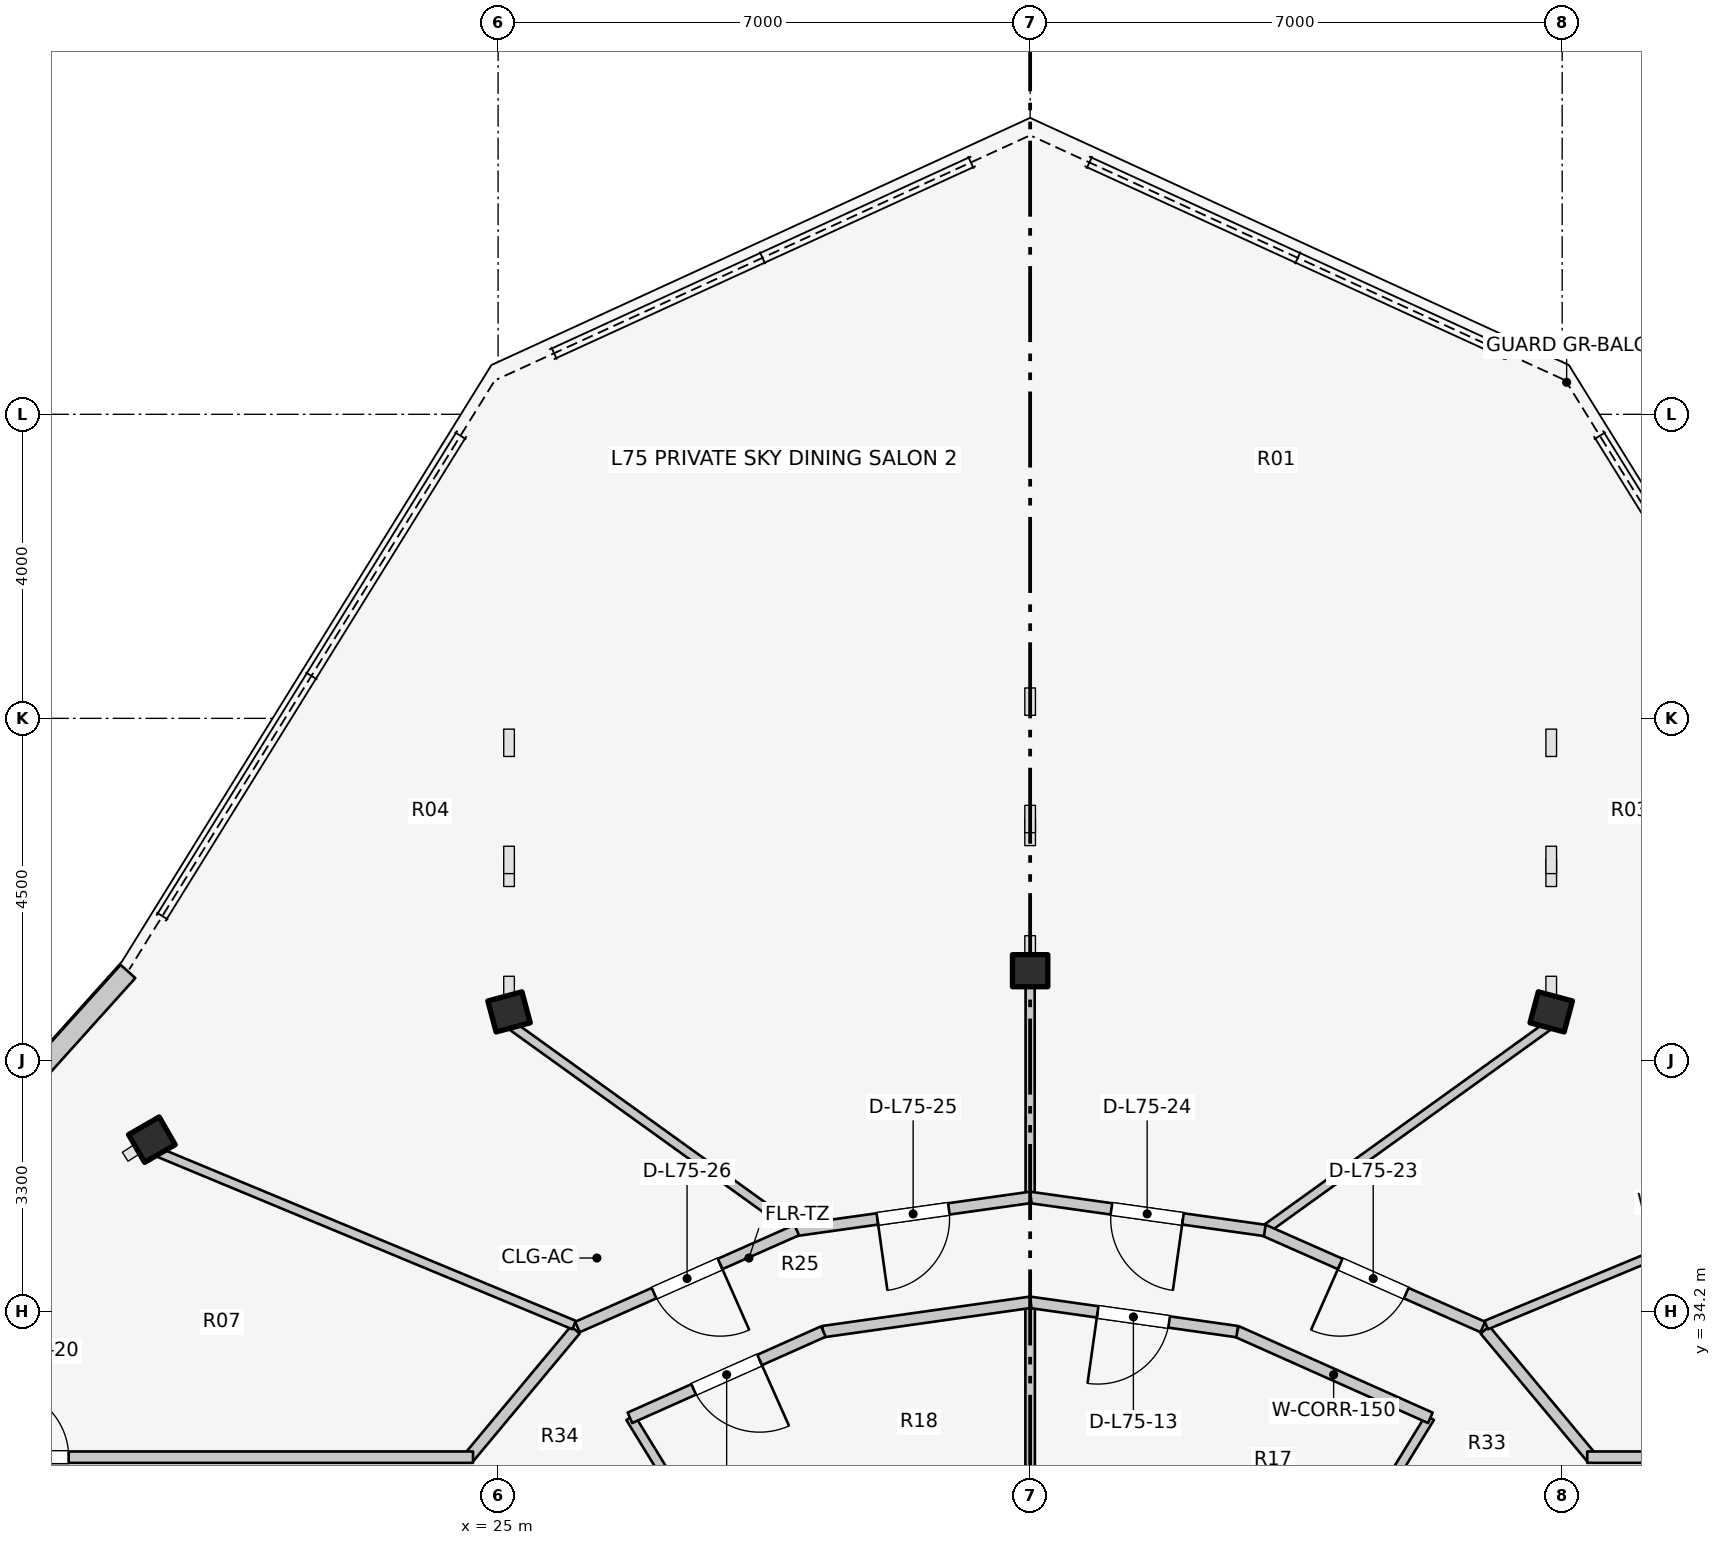
"""IFC4 building model, lengths in metres.
Left out: names, types, materials, properties, quantities, classifications, styles, units other than length and angle.
Written with IfcOpenShell. Run it as: python <this file> out.ifc"""

import sys

from ifc_helpers import new_model, si_unit, direction, frame, frame_2d, origin, origin_2d, place, context, subcontext, project, spatial, rectangle, i_section, extrude, element, fill, save


model = new_model("IFC4")
c1 = context("Model", 3, precision=1e-05, world=origin(), true_north=direction((0.0, 1.0)))
c2 = subcontext(c1, "Body", "Model", "MODEL_VIEW")
j1 = project(units=[si_unit("LENGTHUNIT", "METRE"), si_unit("PLANEANGLEUNIT", "RADIAN")], contexts=[c1])
p1 = place(None, origin())
s1 = spatial("IfcSite", under=j1, at=p1, CompositionType="ELEMENT")
p2 = place(p1, origin())
s2 = spatial("IfcBuilding", under=s1, at=p2, CompositionType="ELEMENT")
p3 = place(p2, frame((0.0, 0.0, 246.0)))
s3 = spatial("IfcBuildingStorey", under=s2, at=p3, CompositionType="ELEMENT", Elevation=246.0)
for number, where, z_axis, x_axis in (
    (1, (38.856, 38.138, 0.0), (0.0, 0.0, 1.0), (0.259, 0.966, 0.0)),
    (2, (32.0, 38.68, 0.0), (0.0, 0.0, 1.0), (0.0, 1.0, 0.0)),
    (3, (25.144, 38.138, 0.0), (0.0, 0.0, 1.0), (-0.259, 0.966, 0.0)),
    (4, (20.445, 36.457, 0.0), (0.0, 0.0, 1.0), (-0.5, 0.866, 0.0)),
):
    element("IfcColumn", number, at=place(p3, frame(where, z_axis=z_axis, x_axis=x_axis)), inside=s3, PredefinedType="COLUMN", context=c2, shape_type="SweptSolid", body=[
        extrude(i_section(OverallWidth=0.422, OverallDepth=0.465, WebThickness=0.045, FlangeThickness=0.073, FilletRadius=0.025, at=origin_2d()), origin(), (0.0, 0.0, 1.0), 3.6),
    ])
p4 = place(p3, frame((20.13, 38.67, 0.0), z_axis=(0.0, 0.0, 1.0), x_axis=(-0.668903560134, -0.743349196031, 0.0)))
e5 = element("IfcWall", 5, at=p4, inside=s3, PredefinedType="STANDARD", context=c2, shape_type="SweptSolid", body=[
    extrude(rectangle(XDim=5.513, YDim=0.26, at=frame_2d((2.756, 0.0))), origin(), (0.0, 0.0, 1.0), 3.29),
])
p5 = place(p3, frame((35.55, 30.015, 0.0), z_axis=(0.0, 0.0, 1.0), x_axis=(0.522763432117, 0.852477796802, 0.0)))
e6 = element("IfcWall", 6, at=p5, inside=s3, PredefinedType="PARTITIONING", context=c2, shape_type="SweptSolid", body=[
    extrude(rectangle(XDim=3.269, YDim=0.125, at=frame_2d((1.635, 0.0))), origin(), (0.0, 0.0, 1.0), 2.672),
])
p6 = place(p3, frame((32.0, 31.1, 0.0), z_axis=(0.0, 0.0, 1.0), x_axis=(0.0, 1.0, 0.0)))
e7 = element("IfcWall", 7, at=p6, inside=s3, PredefinedType="PARTITIONING", context=c2, shape_type="SweptSolid", body=[
    extrude(rectangle(XDim=3.218, YDim=0.125, at=frame_2d((1.609, 0.0))), origin(), (0.0, 0.0, 1.0), 2.672),
])
p7 = place(p3, frame((28.45, 30.015, 0.0), z_axis=(0.0, 0.0, 1.0), x_axis=(-0.522763432117, 0.852477796802, 0.0)))
e8 = element("IfcWall", 8, at=p7, inside=s3, PredefinedType="PARTITIONING", context=c2, shape_type="SweptSolid", body=[
    extrude(rectangle(XDim=3.269, YDim=0.125, at=frame_2d((1.635, 0.0))), origin(), (0.0, 0.0, 1.0), 2.672),
])
p8 = place(p3, frame((37.265, 32.798, 0.0), z_axis=(0.0, 0.0, 1.0), x_axis=(-0.913254317828, 0.407389924971, 0.0)))
e9 = element("IfcWall", 9, at=p8, inside=s3, PredefinedType="PARTITIONING", context=c2, shape_type="SweptSolid", body=[
    extrude(rectangle(XDim=2.787, YDim=0.15, at=frame_2d((1.393, 0.0))), origin(), (0.0, 0.0, 1.0), 2.823),
])
p9 = place(p3, frame((34.724, 33.932, 0.0), z_axis=(0.0, 0.0, 1.0), x_axis=(-0.990150268487, 0.140008734782, 0.0)))
e10 = element("IfcWall", 10, at=p9, inside=s3, PredefinedType="PARTITIONING", context=c2, shape_type="SweptSolid", body=[
    extrude(rectangle(XDim=2.759, YDim=0.15, at=frame_2d((1.379, 0.0))), origin(), (0.0, 0.0, 1.0), 2.823),
])
p10 = place(p9, frame((0.904, 0.0, 0.0)))
e11 = element("IfcOpeningElement", 11, at=p10, cuts=e10, PredefinedType="OPENING", context=c2, shape_type="SweptSolid", body=[
    extrude(rectangle(XDim=0.95, YDim=2.1, at=frame_2d((0.475, 1.05))), frame((0.0, 0.085, 0.0), z_axis=(0.0, -1.0, 0.0), x_axis=(1.0, 0.0, 0.0)), (0.0, 0.0, 1.0), 0.17),
])
p11 = place(p3, frame((32.007, 34.318, 0.0), z_axis=(0.0, 0.0, 1.0), x_axis=(-0.990150268487, -0.140008734782, 0.0)))
e12 = element("IfcWall", 12, at=p11, inside=s3, PredefinedType="PARTITIONING", context=c2, shape_type="SweptSolid", body=[
    extrude(rectangle(XDim=2.759, YDim=0.15, at=frame_2d((1.379, 0.0))), origin(), (0.0, 0.0, 1.0), 2.823),
])
p12 = place(p3, frame((29.28, 33.933, 0.0), z_axis=(0.0, 0.0, 1.0), x_axis=(-0.913254317828, -0.407389924971, 0.0)))
e13 = element("IfcWall", 13, at=p12, inside=s3, PredefinedType="PARTITIONING", context=c2, shape_type="SweptSolid", body=[
    extrude(rectangle(XDim=2.787, YDim=0.15, at=frame_2d((1.393, 0.0))), origin(), (0.0, 0.0, 1.0), 2.823),
])
p13 = place(p12, frame((0.918, 0.0, 0.0)))
e14 = element("IfcOpeningElement", 14, at=p13, cuts=e13, PredefinedType="OPENING", context=c2, shape_type="SweptSolid", body=[
    extrude(rectangle(XDim=0.95, YDim=2.1, at=frame_2d((0.475, 1.05))), frame((0.0, 0.085, 0.0), z_axis=(0.0, -1.0, 0.0), x_axis=(1.0, 0.0, 0.0)), (0.0, 0.0, 1.0), 0.17),
])
p14 = place(p3, frame((37.984, 33.955, 0.0), z_axis=(0.0, 0.0, 1.0), x_axis=(0.64030392053, -0.76812166312, 0.0)))
e15 = element("IfcWall", 15, at=p14, inside=s3, PredefinedType="PARTITIONING", context=c2, shape_type="SweptSolid", body=[
    extrude(rectangle(XDim=2.21, YDim=0.15, at=frame_2d((1.105, 0.0))), origin(), (0.0, 0.0, 1.0), 2.816),
])
p15 = place(p3, frame((39.33, 32.28, 0.0), z_axis=(0.0, 0.0, 1.0), x_axis=(1.0, 0.0, 0.0)))
e16 = element("IfcWall", 16, at=p15, inside=s3, PredefinedType="PARTITIONING", context=c2, shape_type="SweptSolid", body=[
    extrude(rectangle(XDim=7.52, YDim=0.15, at=frame_2d((3.76, 0.0))), origin(), (0.0, 0.0, 1.0), 2.816),
])
p16 = place(p15, frame((5.22, 0.0, 0.0)))
e17 = element("IfcOpeningElement", 17, at=p16, cuts=e16, PredefinedType="OPENING", context=c2, shape_type="SweptSolid", body=[
    extrude(rectangle(XDim=0.9, YDim=2.1, at=frame_2d((0.45, 1.05))), frame((0.0, 0.085, 0.0), z_axis=(0.0, -1.0, 0.0), x_axis=(1.0, 0.0, 0.0)), (0.0, 0.0, 1.0), 0.17),
])
p17 = place(p3, frame((26.016, 33.955, 0.0), z_axis=(0.0, 0.0, 1.0), x_axis=(-0.64030392053, -0.76812166312, 0.0)))
e18 = element("IfcWall", 18, at=p17, inside=s3, PredefinedType="PARTITIONING", context=c2, shape_type="SweptSolid", body=[
    extrude(rectangle(XDim=2.21, YDim=0.15, at=frame_2d((1.105, 0.0))), origin(), (0.0, 0.0, 1.0), 2.816),
])
p18 = place(p3, frame((17.15, 32.28, 0.0), z_axis=(0.0, 0.0, 1.0), x_axis=(1.0, 0.0, 0.0)))
e19 = element("IfcWall", 19, at=p18, inside=s3, PredefinedType="PARTITIONING", context=c2, shape_type="SweptSolid", body=[
    extrude(rectangle(XDim=7.52, YDim=0.15, at=frame_2d((3.76, 0.0))), origin(), (0.0, 0.0, 1.0), 2.816),
])
p19 = place(p18, frame((1.3, 0.0, 0.0)))
e20 = element("IfcOpeningElement", 20, at=p19, cuts=e19, PredefinedType="OPENING", context=c2, shape_type="SweptSolid", body=[
    extrude(rectangle(XDim=0.9, YDim=2.1, at=frame_2d((0.45, 1.05))), frame((0.0, 0.085, 0.0), z_axis=(0.0, -1.0, 0.0), x_axis=(1.0, 0.0, 0.0)), (0.0, 0.0, 1.0), 0.17),
])
p20 = place(p3, frame((38.0, 34.018, 0.0), z_axis=(0.0, 0.0, 1.0), x_axis=(0.92349333748, 0.383614462228, 0.0)))
e21 = element("IfcWall", 21, at=p20, inside=s3, PredefinedType="MOVABLE", context=c2, shape_type="SweptSolid", body=[
    extrude(rectangle(XDim=5.907, YDim=0.12, at=frame_2d((2.954, 0.0))), origin(), (0.0, 0.0, 1.0), 2.66),
])
p21 = place(p3, frame((35.124, 35.297, 0.0), z_axis=(0.0, 0.0, 1.0), x_axis=(0.811745719064, 0.584011033783, 0.0)))
e22 = element("IfcWall", 22, at=p21, inside=s3, PredefinedType="MOVABLE", context=c2, shape_type="SweptSolid", body=[
    extrude(rectangle(XDim=4.534, YDim=0.12, at=frame_2d((2.267, 0.0))), origin(), (0.0, 0.0, 1.0), 2.66),
])
p22 = place(p3, frame((32.0, 35.753, 0.0), z_axis=(0.0, 0.0, 1.0), x_axis=(0.0, 1.0, 0.0)))
e23 = element("IfcWall", 23, at=p22, inside=s3, PredefinedType="MOVABLE", context=c2, shape_type="SweptSolid", body=[
    extrude(rectangle(XDim=2.727, YDim=0.12, at=frame_2d((1.364, 0.0))), origin(), (0.0, 0.0, 1.0), 2.66),
])
p23 = place(p3, frame((28.876, 35.297, 0.0), z_axis=(0.0, 0.0, 1.0), x_axis=(-0.811745719064, 0.584011033783, 0.0)))
e24 = element("IfcWall", 24, at=p23, inside=s3, PredefinedType="MOVABLE", context=c2, shape_type="SweptSolid", body=[
    extrude(rectangle(XDim=4.534, YDim=0.12, at=frame_2d((2.267, 0.0))), origin(), (0.0, 0.0, 1.0), 2.66),
])
p24 = place(p3, frame((26.0, 34.018, 0.0), z_axis=(0.0, 0.0, 1.0), x_axis=(-0.92349333748, 0.383614462228, 0.0)))
e25 = element("IfcWall", 25, at=p24, inside=s3, PredefinedType="MOVABLE", context=c2, shape_type="SweptSolid", body=[
    extrude(rectangle(XDim=5.907, YDim=0.12, at=frame_2d((2.954, 0.0))), origin(), (0.0, 0.0, 1.0), 2.66),
])
p25 = place(p3, frame((37.956, 33.992, 0.0), z_axis=(0.0, 0.0, 1.0), x_axis=(-0.914642679993, 0.404263240891, 0.0)))
e26 = element("IfcWall", 26, at=p25, inside=s3, PredefinedType="PARTITIONING", context=c2, shape_type="SweptSolid", body=[
    extrude(rectangle(XDim=3.154, YDim=0.15, at=frame_2d((1.577, 0.0))), origin(), (0.0, 0.0, 1.0), 2.823),
])
p26 = place(p25, frame((1.102, 0.0, 0.0)))
e27 = element("IfcOpeningElement", 27, at=p26, cuts=e26, PredefinedType="OPENING", context=c2, shape_type="SweptSolid", body=[
    extrude(rectangle(XDim=0.95, YDim=2.1, at=frame_2d((0.475, 1.05))), frame((0.0, 0.085, 0.0), z_axis=(0.0, -1.0, 0.0), x_axis=(1.0, 0.0, 0.0)), (0.0, 0.0, 1.0), 0.17),
])
p27 = place(p3, frame((35.087, 35.263, 0.0), z_axis=(0.0, 0.0, 1.0), x_axis=(-0.990268690673, 0.139168675614, 0.0)))
e28 = element("IfcWall", 28, at=p27, inside=s3, PredefinedType="PARTITIONING", context=c2, shape_type="SweptSolid", body=[
    extrude(rectangle(XDim=3.126, YDim=0.15, at=frame_2d((1.563, 0.0))), origin(), (0.0, 0.0, 1.0), 2.823),
])
p28 = place(p27, frame((1.088, 0.0, 0.0)))
e29 = element("IfcOpeningElement", 29, at=p28, cuts=e28, PredefinedType="OPENING", context=c2, shape_type="SweptSolid", body=[
    extrude(rectangle(XDim=0.95, YDim=2.1, at=frame_2d((0.475, 1.05))), frame((0.0, 0.085, 0.0), z_axis=(0.0, -1.0, 0.0), x_axis=(1.0, 0.0, 0.0)), (0.0, 0.0, 1.0), 0.17),
])
p29 = place(p3, frame((32.008, 35.698, 0.0), z_axis=(0.0, 0.0, 1.0), x_axis=(-0.990268690673, -0.139168675614, 0.0)))
e30 = element("IfcWall", 30, at=p29, inside=s3, PredefinedType="PARTITIONING", context=c2, shape_type="SweptSolid", body=[
    extrude(rectangle(XDim=3.126, YDim=0.15, at=frame_2d((1.563, 0.0))), origin(), (0.0, 0.0, 1.0), 2.823),
])
p30 = place(p29, frame((1.088, 0.0, 0.0)))
e31 = element("IfcOpeningElement", 31, at=p30, cuts=e30, PredefinedType="OPENING", context=c2, shape_type="SweptSolid", body=[
    extrude(rectangle(XDim=0.95, YDim=2.1, at=frame_2d((0.475, 1.05))), frame((0.0, 0.085, 0.0), z_axis=(0.0, -1.0, 0.0), x_axis=(1.0, 0.0, 0.0)), (0.0, 0.0, 1.0), 0.17),
])
p31 = place(p3, frame((28.929, 35.268, 0.0), z_axis=(0.0, 0.0, 1.0), x_axis=(-0.914642679993, -0.404263240891, 0.0)))
e32 = element("IfcWall", 32, at=p31, inside=s3, PredefinedType="PARTITIONING", context=c2, shape_type="SweptSolid", body=[
    extrude(rectangle(XDim=3.154, YDim=0.15, at=frame_2d((1.577, 0.0))), origin(), (0.0, 0.0, 1.0), 2.823),
])
p32 = place(p31, frame((1.102, 0.0, 0.0)))
e33 = element("IfcOpeningElement", 33, at=p32, cuts=e32, PredefinedType="OPENING", context=c2, shape_type="SweptSolid", body=[
    extrude(rectangle(XDim=0.95, YDim=2.1, at=frame_2d((0.475, 1.05))), frame((0.0, 0.085, 0.0), z_axis=(0.0, -1.0, 0.0), x_axis=(1.0, 0.0, 0.0)), (0.0, 0.0, 1.0), 0.17),
])
p33 = place(p10, origin())
e34 = element("IfcDoor", 34, at=p33, inside=s3, OperationType="SINGLE_SWING_RIGHT", PredefinedType="DOOR", context=c2, shape_type="SweptSolid", body=[
    extrude(rectangle(XDim=0.95, YDim=2.1, at=frame_2d((0.475, 1.05))), frame((0.0, 0.025, 0.0), z_axis=(0.0, -1.0, 0.0), x_axis=(1.0, 0.0, 0.0)), (0.0, 0.0, 1.0), 0.05),
])
fill(e11, e34)
p34 = place(p13, origin())
e35 = element("IfcDoor", 35, at=p34, inside=s3, OperationType="SINGLE_SWING_LEFT", PredefinedType="DOOR", context=c2, shape_type="SweptSolid", body=[
    extrude(rectangle(XDim=0.95, YDim=2.1, at=frame_2d((0.475, 1.05))), frame((0.0, 0.025, 0.0), z_axis=(0.0, -1.0, 0.0), x_axis=(1.0, 0.0, 0.0)), (0.0, 0.0, 1.0), 0.05),
])
fill(e14, e35)
p35 = place(p19, origin())
e36 = element("IfcDoor", 36, at=p35, inside=s3, OperationType="SINGLE_SWING_LEFT", PredefinedType="DOOR", context=c2, shape_type="SweptSolid", body=[
    extrude(rectangle(XDim=0.9, YDim=2.1, at=frame_2d((0.45, 1.05))), frame((0.0, 0.025, 0.0), z_axis=(0.0, -1.0, 0.0), x_axis=(1.0, 0.0, 0.0)), (0.0, 0.0, 1.0), 0.05),
])
fill(e20, e36)
p36 = place(p26, origin())
e37 = element("IfcDoor", 37, at=p36, inside=s3, OperationType="SINGLE_SWING_RIGHT", PredefinedType="DOOR", context=c2, shape_type="SweptSolid", body=[
    extrude(rectangle(XDim=0.95, YDim=2.1, at=frame_2d((0.475, 1.05))), frame((0.0, 0.025, 0.0), z_axis=(0.0, -1.0, 0.0), x_axis=(1.0, 0.0, 0.0)), (0.0, 0.0, 1.0), 0.05),
])
fill(e27, e37)
p37 = place(p28, origin())
e38 = element("IfcDoor", 38, at=p37, inside=s3, OperationType="SINGLE_SWING_LEFT", PredefinedType="DOOR", context=c2, shape_type="SweptSolid", body=[
    extrude(rectangle(XDim=0.95, YDim=2.1, at=frame_2d((0.475, 1.05))), frame((0.0, 0.025, 0.0), z_axis=(0.0, -1.0, 0.0), x_axis=(1.0, 0.0, 0.0)), (0.0, 0.0, 1.0), 0.05),
])
fill(e29, e38)
p38 = place(p30, origin())
e39 = element("IfcDoor", 39, at=p38, inside=s3, OperationType="SINGLE_SWING_RIGHT", PredefinedType="DOOR", context=c2, shape_type="SweptSolid", body=[
    extrude(rectangle(XDim=0.95, YDim=2.1, at=frame_2d((0.475, 1.05))), frame((0.0, 0.025, 0.0), z_axis=(0.0, -1.0, 0.0), x_axis=(1.0, 0.0, 0.0)), (0.0, 0.0, 1.0), 0.05),
])
fill(e31, e39)
p39 = place(p32, origin())
e40 = element("IfcDoor", 40, at=p39, inside=s3, OperationType="SINGLE_SWING_LEFT", PredefinedType="DOOR", context=c2, shape_type="SweptSolid", body=[
    extrude(rectangle(XDim=0.95, YDim=2.1, at=frame_2d((0.475, 1.05))), frame((0.0, 0.025, 0.0), z_axis=(0.0, -1.0, 0.0), x_axis=(1.0, 0.0, 0.0)), (0.0, 0.0, 1.0), 0.05),
])
fill(e33, e40)
save(model, sys.argv[1])
